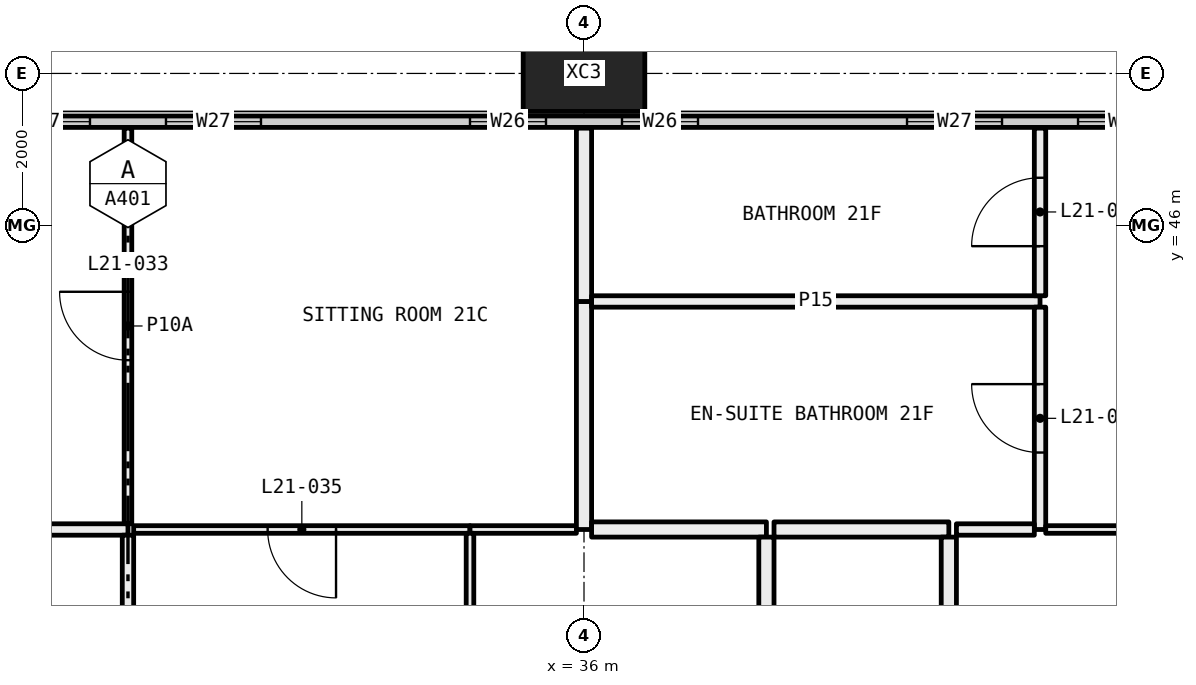
"""IFC4 building model, lengths in metres.
Left out: names, types, materials, properties, quantities, classifications, styles, units other than length and angle.
Written with IfcOpenShell. Run it as: python <this file> out.ifc"""

import sys

from ifc_helpers import new_model, si_unit, direction, frame, frame_2d, origin, origin_2d, place, context, subcontext, project, spatial, rectangle, hollow_rectangle, extrude, element, fill, save


model = new_model("IFC4")
c1 = context("Model", 3, precision=1e-05, world=origin(), true_north=direction((0.0, 1.0)))
c2 = subcontext(c1, "Body", "Model", "MODEL_VIEW")
j1 = project(units=[si_unit("LENGTHUNIT", "METRE"), si_unit("PLANEANGLEUNIT", "RADIAN")], contexts=[c1])
p1 = place(None, origin())
s1 = spatial("IfcSite", under=j1, at=p1, CompositionType="ELEMENT")
p2 = place(p1, origin())
s2 = spatial("IfcBuilding", under=s1, at=p2, CompositionType="ELEMENT")
p3 = place(p2, frame((0.0, 0.0, 85.2)))
s3 = spatial("IfcBuildingStorey", under=s2, at=p3, CompositionType="ELEMENT", Elevation=85.2)
p4 = place(p3, frame((36.0, 48.0, -0.4), z_axis=(0.0, 0.0, 1.0), x_axis=(1.0, 0.0, 0.0)))
e1 = element("IfcColumn", 1, at=p4, inside=s3, PredefinedType="COLUMN", context=c2, shape_type="SweptSolid", body=[
    extrude(hollow_rectangle(XDim=1.6, YDim=1.0, WallThickness=0.065, at=origin_2d()), origin(), (0.0, 0.0, 1.0), 3.45),
])
p5 = place(p3, frame((6.56, 47.365, 0.0), z_axis=(0.0, 0.0, 1.0), x_axis=(1.0, 0.0, 0.0)))
e2 = element("IfcWall", 2, at=p5, inside=s3, PredefinedType="ELEMENTEDWALL", context=c2, shape_type="SweptSolid", body=[
    extrude(rectangle(XDim=58.88, YDim=0.15, at=frame_2d((29.44, 0.0))), origin(), (0.0, 0.0, 1.0), 3.05),
])
p6 = place(p5, frame((0.44, 0.0, 0.45)))
e3 = element("IfcOpeningElement", 3, at=p6, cuts=e2, PredefinedType="OPENING", context=c2, shape_type="SweptSolid", body=[
    extrude(rectangle(XDim=4.5, YDim=2.55, at=frame_2d((2.25, 1.275))), frame((0.0, 0.085, 0.0), z_axis=(0.0, -1.0, 0.0), x_axis=(1.0, 0.0, 0.0)), (0.0, 0.0, 1.0), 0.17),
])
p7 = place(p5, frame((5.94, 0.0, 0.45)))
e4 = element("IfcOpeningElement", 4, at=p7, cuts=e2, PredefinedType="OPENING", context=c2, shape_type="SweptSolid", body=[
    extrude(rectangle(XDim=1.0, YDim=2.55, at=frame_2d((0.5, 1.275))), frame((0.0, 0.085, 0.0), z_axis=(0.0, -1.0, 0.0), x_axis=(1.0, 0.0, 0.0)), (0.0, 0.0, 1.0), 0.17),
])
p8 = place(p5, frame((9.69, 0.0, 0.45)))
e5 = element("IfcOpeningElement", 5, at=p8, cuts=e2, PredefinedType="OPENING", context=c2, shape_type="SweptSolid", body=[
    extrude(rectangle(XDim=1.25, YDim=2.55, at=frame_2d((0.625, 1.275))), frame((0.0, 0.085, 0.0), z_axis=(0.0, -1.0, 0.0), x_axis=(1.0, 0.0, 0.0)), (0.0, 0.0, 1.0), 0.17),
])
p9 = place(p5, frame((11.94, 0.0, 0.45)))
e6 = element("IfcOpeningElement", 6, at=p9, cuts=e2, PredefinedType="OPENING", context=c2, shape_type="SweptSolid", body=[
    extrude(rectangle(XDim=1.25, YDim=2.55, at=frame_2d((0.625, 1.275))), frame((0.0, 0.085, 0.0), z_axis=(0.0, -1.0, 0.0), x_axis=(1.0, 0.0, 0.0)), (0.0, 0.0, 1.0), 0.17),
])
p10 = place(p5, frame((15.94, 0.0, 0.45)))
e7 = element("IfcOpeningElement", 7, at=p10, cuts=e2, PredefinedType="OPENING", context=c2, shape_type="SweptSolid", body=[
    extrude(rectangle(XDim=1.0, YDim=2.55, at=frame_2d((0.5, 1.275))), frame((0.0, 0.085, 0.0), z_axis=(0.0, -1.0, 0.0), x_axis=(1.0, 0.0, 0.0)), (0.0, 0.0, 1.0), 0.17),
])
p11 = place(p5, frame((17.94, 0.0, 0.45)))
e8 = element("IfcOpeningElement", 8, at=p11, cuts=e2, PredefinedType="OPENING", context=c2, shape_type="SweptSolid", body=[
    extrude(rectangle(XDim=1.0, YDim=2.55, at=frame_2d((0.5, 1.275))), frame((0.0, 0.085, 0.0), z_axis=(0.0, -1.0, 0.0), x_axis=(1.0, 0.0, 0.0)), (0.0, 0.0, 1.0), 0.17),
])
p12 = place(p5, frame((21.69, 0.0, 0.45)))
e9 = element("IfcOpeningElement", 9, at=p12, cuts=e2, PredefinedType="OPENING", context=c2, shape_type="SweptSolid", body=[
    extrude(rectangle(XDim=1.25, YDim=2.55, at=frame_2d((0.625, 1.275))), frame((0.0, 0.085, 0.0), z_axis=(0.0, -1.0, 0.0), x_axis=(1.0, 0.0, 0.0)), (0.0, 0.0, 1.0), 0.17),
])
p13 = place(p5, frame((23.94, 0.0, 0.45)))
e10 = element("IfcOpeningElement", 10, at=p13, cuts=e2, PredefinedType="OPENING", context=c2, shape_type="SweptSolid", body=[
    extrude(rectangle(XDim=1.25, YDim=2.55, at=frame_2d((0.625, 1.275))), frame((0.0, 0.085, 0.0), z_axis=(0.0, -1.0, 0.0), x_axis=(1.0, 0.0, 0.0)), (0.0, 0.0, 1.0), 0.17),
])
p14 = place(p5, frame((27.94, 0.0, 0.45)))
e11 = element("IfcOpeningElement", 11, at=p14, cuts=e2, PredefinedType="OPENING", context=c2, shape_type="SweptSolid", body=[
    extrude(rectangle(XDim=1.0, YDim=2.55, at=frame_2d((0.5, 1.275))), frame((0.0, 0.085, 0.0), z_axis=(0.0, -1.0, 0.0), x_axis=(1.0, 0.0, 0.0)), (0.0, 0.0, 1.0), 0.17),
])
p15 = place(p5, frame((29.94, 0.0, 0.45)))
e12 = element("IfcOpeningElement", 12, at=p15, cuts=e2, PredefinedType="OPENING", context=c2, shape_type="SweptSolid", body=[
    extrude(rectangle(XDim=1.0, YDim=2.55, at=frame_2d((0.5, 1.275))), frame((0.0, 0.085, 0.0), z_axis=(0.0, -1.0, 0.0), x_axis=(1.0, 0.0, 0.0)), (0.0, 0.0, 1.0), 0.17),
])
p16 = place(p5, frame((33.69, 0.0, 0.45)))
e13 = element("IfcOpeningElement", 13, at=p16, cuts=e2, PredefinedType="OPENING", context=c2, shape_type="SweptSolid", body=[
    extrude(rectangle(XDim=1.25, YDim=2.55, at=frame_2d((0.625, 1.275))), frame((0.0, 0.085, 0.0), z_axis=(0.0, -1.0, 0.0), x_axis=(1.0, 0.0, 0.0)), (0.0, 0.0, 1.0), 0.17),
])
p17 = place(p5, frame((35.94, 0.0, 0.45)))
e14 = element("IfcOpeningElement", 14, at=p17, cuts=e2, PredefinedType="OPENING", context=c2, shape_type="SweptSolid", body=[
    extrude(rectangle(XDim=1.25, YDim=2.55, at=frame_2d((0.625, 1.275))), frame((0.0, 0.085, 0.0), z_axis=(0.0, -1.0, 0.0), x_axis=(1.0, 0.0, 0.0)), (0.0, 0.0, 1.0), 0.17),
])
p18 = place(p5, frame((39.94, 0.0, 0.45)))
e15 = element("IfcOpeningElement", 15, at=p18, cuts=e2, PredefinedType="OPENING", context=c2, shape_type="SweptSolid", body=[
    extrude(rectangle(XDim=1.0, YDim=2.55, at=frame_2d((0.5, 1.275))), frame((0.0, 0.085, 0.0), z_axis=(0.0, -1.0, 0.0), x_axis=(1.0, 0.0, 0.0)), (0.0, 0.0, 1.0), 0.17),
])
p19 = place(p5, frame((41.94, 0.0, 0.45)))
e16 = element("IfcOpeningElement", 16, at=p19, cuts=e2, PredefinedType="OPENING", context=c2, shape_type="SweptSolid", body=[
    extrude(rectangle(XDim=1.0, YDim=2.55, at=frame_2d((0.5, 1.275))), frame((0.0, 0.085, 0.0), z_axis=(0.0, -1.0, 0.0), x_axis=(1.0, 0.0, 0.0)), (0.0, 0.0, 1.0), 0.17),
])
p20 = place(p5, frame((45.69, 0.0, 0.45)))
e17 = element("IfcOpeningElement", 17, at=p20, cuts=e2, PredefinedType="OPENING", context=c2, shape_type="SweptSolid", body=[
    extrude(rectangle(XDim=1.25, YDim=2.55, at=frame_2d((0.625, 1.275))), frame((0.0, 0.085, 0.0), z_axis=(0.0, -1.0, 0.0), x_axis=(1.0, 0.0, 0.0)), (0.0, 0.0, 1.0), 0.17),
])
p21 = place(p5, frame((47.94, 0.0, 0.45)))
e18 = element("IfcOpeningElement", 18, at=p21, cuts=e2, PredefinedType="OPENING", context=c2, shape_type="SweptSolid", body=[
    extrude(rectangle(XDim=1.25, YDim=2.55, at=frame_2d((0.625, 1.275))), frame((0.0, 0.085, 0.0), z_axis=(0.0, -1.0, 0.0), x_axis=(1.0, 0.0, 0.0)), (0.0, 0.0, 1.0), 0.17),
])
p22 = place(p5, frame((51.94, 0.0, 0.45)))
e19 = element("IfcOpeningElement", 19, at=p22, cuts=e2, PredefinedType="OPENING", context=c2, shape_type="SweptSolid", body=[
    extrude(rectangle(XDim=1.0, YDim=2.55, at=frame_2d((0.5, 1.275))), frame((0.0, 0.085, 0.0), z_axis=(0.0, -1.0, 0.0), x_axis=(1.0, 0.0, 0.0)), (0.0, 0.0, 1.0), 0.17),
])
p23 = place(p5, frame((53.94, 0.0, 0.45)))
e20 = element("IfcOpeningElement", 20, at=p23, cuts=e2, PredefinedType="OPENING", context=c2, shape_type="SweptSolid", body=[
    extrude(rectangle(XDim=4.5, YDim=2.55, at=frame_2d((2.25, 1.275))), frame((0.0, 0.085, 0.0), z_axis=(0.0, -1.0, 0.0), x_axis=(1.0, 0.0, 0.0)), (0.0, 0.0, 1.0), 0.17),
])
p24 = place(p3, frame((30.0, 42.075, 0.0), z_axis=(0.0, 0.0, 1.0), x_axis=(0.0, 1.0, 0.0)))
e21 = element("IfcWall", 21, at=p24, inside=s3, PredefinedType="PARTITIONING", context=c2, shape_type="SweptSolid", body=[
    extrude(rectangle(XDim=5.205, YDim=0.1, at=frame_2d((2.603, 0.0))), origin(), (0.0, 0.0, 1.0), 3.05),
])
p25 = place(p24, frame((2.153, 0.0, 0.0)))
e22 = element("IfcOpeningElement", 22, at=p25, cuts=e21, PredefinedType="OPENING", context=c2, shape_type="SweptSolid", body=[
    extrude(rectangle(XDim=0.9, YDim=2.1, at=frame_2d((0.45, 1.05))), frame((0.0, 0.06, 0.0), z_axis=(0.0, -1.0, 0.0), x_axis=(1.0, 0.0, 0.0)), (0.0, 0.0, 1.0), 0.12),
])
p26 = place(p3, frame((26.0, 42.0, 0.0), z_axis=(0.0, 0.0, 1.0), x_axis=(1.0, 0.0, 0.0)))
e23 = element("IfcWall", 23, at=p26, inside=s3, PredefinedType="PARTITIONING", context=c2, shape_type="SweptSolid", body=[
    extrude(rectangle(XDim=4.0, YDim=0.15, at=frame_2d((2.0, 0.0))), origin(), (0.0, 0.0, 1.0), 3.05),
])
p27 = place(p26, frame((1.55, 0.0, 0.0)))
e24 = element("IfcOpeningElement", 24, at=p27, cuts=e23, PredefinedType="OPENING", context=c2, shape_type="SweptSolid", body=[
    extrude(rectangle(XDim=0.9, YDim=2.1, at=frame_2d((0.45, 1.05))), frame((0.0, 0.085, 0.0), z_axis=(0.0, -1.0, 0.0), x_axis=(1.0, 0.0, 0.0)), (0.0, 0.0, 1.0), 0.17),
])
p28 = place(p3, frame((30.075, 42.0, 0.0), z_axis=(0.0, 0.0, 1.0), x_axis=(1.0, 0.0, 0.0)))
e25 = element("IfcWall", 25, at=p28, inside=s3, PredefinedType="PARTITIONING", context=c2, shape_type="SweptSolid", body=[
    extrude(rectangle(XDim=4.425, YDim=0.1, at=frame_2d((2.212, 0.0))), origin(), (0.0, 0.0, 1.0), 3.05),
])
p29 = place(p28, frame((1.762, 0.0, 0.0)))
e26 = element("IfcOpeningElement", 26, at=p29, cuts=e25, PredefinedType="OPENING", context=c2, shape_type="SweptSolid", body=[
    extrude(rectangle(XDim=0.9, YDim=2.1, at=frame_2d((0.45, 1.05))), frame((0.0, 0.06, 0.0), z_axis=(0.0, -1.0, 0.0), x_axis=(1.0, 0.0, 0.0)), (0.0, 0.0, 1.0), 0.12),
])
p30 = place(p3, frame((34.5, 42.0, 0.0), z_axis=(0.0, 0.0, 1.0), x_axis=(1.0, 0.0, 0.0)))
e27 = element("IfcWall", 27, at=p30, inside=s3, PredefinedType="PARTITIONING", context=c2, shape_type="SweptSolid", body=[
    extrude(rectangle(XDim=1.4, YDim=0.1, at=frame_2d((0.7, 0.0))), origin(), (0.0, 0.0, 1.0), 3.05),
])
p31 = place(p3, frame((36.0, 42.0, 0.0), z_axis=(0.0, 0.0, 1.0), x_axis=(0.0, 1.0, 0.0)))
e28 = element("IfcWall", 28, at=p31, inside=s3, PredefinedType="PARTITIONING", context=c2, shape_type="SweptSolid", body=[
    extrude(rectangle(XDim=3.0, YDim=0.2, at=frame_2d((1.5, 0.0))), origin(), (0.0, 0.0, 1.0), 2.45),
])
p32 = place(p3, frame((36.0, 45.0, 0.0), z_axis=(0.0, 0.0, 1.0), x_axis=(0.0, 1.0, 0.0)))
e29 = element("IfcWall", 29, at=p32, inside=s3, PredefinedType="PARTITIONING", context=c2, shape_type="SweptSolid", body=[
    extrude(rectangle(XDim=2.28, YDim=0.2, at=frame_2d((1.14, 0.0))), origin(), (0.0, 0.0, 1.0), 2.45),
])
p33 = place(p3, frame((30.0, 38.175, 0.0), z_axis=(0.0, 0.0, 1.0), x_axis=(0.0, 1.0, 0.0)))
e30 = element("IfcWall", 30, at=p33, inside=s3, PredefinedType="PARTITIONING", context=c2, shape_type="SweptSolid", body=[
    extrude(rectangle(XDim=3.75, YDim=0.15, at=frame_2d((1.875, 0.0))), origin(), (0.0, 0.0, 1.0), 3.05),
])
p34 = place(p3, frame((34.5, 36.1, 0.0), z_axis=(0.0, 0.0, 1.0), x_axis=(0.0, 1.0, 0.0)))
e31 = element("IfcWall", 31, at=p34, inside=s3, PredefinedType="PARTITIONING", context=c2, shape_type="SweptSolid", body=[
    extrude(rectangle(XDim=5.85, YDim=0.1, at=frame_2d((2.925, 0.0))), origin(), (0.0, 0.0, 1.0), 3.05),
])
p35 = place(p34, frame((2.475, 0.0, 0.0)))
e32 = element("IfcOpeningElement", 32, at=p35, cuts=e31, PredefinedType="OPENING", context=c2, shape_type="SweptSolid", body=[
    extrude(rectangle(XDim=0.9, YDim=2.1, at=frame_2d((0.45, 1.05))), frame((0.0, 0.06, 0.0), z_axis=(0.0, -1.0, 0.0), x_axis=(1.0, 0.0, 0.0)), (0.0, 0.0, 1.0), 0.12),
])
p36 = place(p3, frame((38.4, 42.0, 0.0), z_axis=(0.0, 0.0, 1.0), x_axis=(-1.0, 0.0, 0.0)))
e33 = element("IfcWall", 33, at=p36, inside=s3, PredefinedType="PARTITIONING", context=c2, shape_type="SweptSolid", body=[
    extrude(rectangle(XDim=2.3, YDim=0.2, at=frame_2d((1.15, 0.0))), origin(), (0.0, 0.0, 1.0), 3.05),
])
p37 = place(p3, frame((38.4, 36.1, 0.0), z_axis=(0.0, 0.0, 1.0), x_axis=(0.0, 1.0, 0.0)))
e34 = element("IfcWall", 34, at=p37, inside=s3, PredefinedType="PARTITIONING", context=c2, shape_type="SweptSolid", body=[
    extrude(rectangle(XDim=5.8, YDim=0.2, at=frame_2d((2.9, 0.0))), origin(), (0.0, 0.0, 1.0), 3.05),
])
p38 = place(p3, frame((42.0, 45.0, 0.0), z_axis=(0.0, 0.0, 1.0), x_axis=(-1.0, 0.0, 0.0)))
e35 = element("IfcWall", 35, at=p38, inside=s3, PredefinedType="PARTITIONING", context=c2, shape_type="SweptSolid", body=[
    extrude(rectangle(XDim=5.9, YDim=0.15, at=frame_2d((2.95, 0.0))), origin(), (0.0, 0.0, 1.0), 3.05),
])
p39 = place(p3, frame((42.0, 42.0, 0.0), z_axis=(0.0, 0.0, 1.0), x_axis=(0.0, 1.0, 0.0)))
e36 = element("IfcWall", 36, at=p39, inside=s3, PredefinedType="PARTITIONING", context=c2, shape_type="SweptSolid", body=[
    extrude(rectangle(XDim=2.925, YDim=0.15, at=frame_2d((1.462, 0.0))), origin(), (0.0, 0.0, 1.0), 3.05),
])
p40 = place(p39, frame((1.012, 0.0, 0.0)))
e37 = element("IfcOpeningElement", 37, at=p40, cuts=e36, PredefinedType="OPENING", context=c2, shape_type="SweptSolid", body=[
    extrude(rectangle(XDim=0.9, YDim=2.1, at=frame_2d((0.45, 1.05))), frame((0.0, 0.085, 0.0), z_axis=(0.0, -1.0, 0.0), x_axis=(1.0, 0.0, 0.0)), (0.0, 0.0, 1.0), 0.17),
])
p41 = place(p3, frame((40.9, 42.0, 0.0), z_axis=(0.0, 0.0, 1.0), x_axis=(1.0, 0.0, 0.0)))
e38 = element("IfcWall", 38, at=p41, inside=s3, PredefinedType="PARTITIONING", context=c2, shape_type="SweptSolid", body=[
    extrude(rectangle(XDim=1.025, YDim=0.15, at=frame_2d((0.513, 0.0))), origin(), (0.0, 0.0, 1.0), 3.05),
])
p42 = place(p3, frame((38.5, 42.0, 0.0), z_axis=(0.0, 0.0, 1.0), x_axis=(1.0, 0.0, 0.0)))
e39 = element("IfcWall", 39, at=p42, inside=s3, PredefinedType="PARTITIONING", context=c2, shape_type="SweptSolid", body=[
    extrude(rectangle(XDim=2.3, YDim=0.2, at=frame_2d((1.15, 0.0))), origin(), (0.0, 0.0, 1.0), 3.05),
])
p43 = place(p3, frame((42.0, 45.075, 0.0), z_axis=(0.0, 0.0, 1.0), x_axis=(0.0, 1.0, 0.0)))
e40 = element("IfcWall", 40, at=p43, inside=s3, PredefinedType="PARTITIONING", context=c2, shape_type="SweptSolid", body=[
    extrude(rectangle(XDim=2.205, YDim=0.15, at=frame_2d((1.103, 0.0))), origin(), (0.0, 0.0, 1.0), 3.05),
])
p44 = place(p43, frame((0.653, 0.0, 0.0)))
e41 = element("IfcOpeningElement", 41, at=p44, cuts=e40, PredefinedType="OPENING", context=c2, shape_type="SweptSolid", body=[
    extrude(rectangle(XDim=0.9, YDim=2.1, at=frame_2d((0.45, 1.05))), frame((0.0, 0.085, 0.0), z_axis=(0.0, -1.0, 0.0), x_axis=(1.0, 0.0, 0.0)), (0.0, 0.0, 1.0), 0.17),
])
p45 = place(p3, frame((42.075, 42.0, 0.0), z_axis=(0.0, 0.0, 1.0), x_axis=(1.0, 0.0, 0.0)))
e42 = element("IfcWall", 42, at=p45, inside=s3, PredefinedType="PARTITIONING", context=c2, shape_type="SweptSolid", body=[
    extrude(rectangle(XDim=3.925, YDim=0.1, at=frame_2d((1.962, 0.0))), origin(), (0.0, 0.0, 1.0), 3.05),
])
p46 = place(p45, frame((1.512, 0.0, 0.0)))
e43 = element("IfcOpeningElement", 43, at=p46, cuts=e42, PredefinedType="OPENING", context=c2, shape_type="SweptSolid", body=[
    extrude(rectangle(XDim=0.9, YDim=2.1, at=frame_2d((0.45, 1.05))), frame((0.0, 0.06, 0.0), z_axis=(0.0, -1.0, 0.0), x_axis=(1.0, 0.0, 0.0)), (0.0, 0.0, 1.0), 0.12),
])
p47 = place(p3, frame((40.8, 41.9, 0.0), z_axis=(0.0, 0.0, 1.0), x_axis=(0.0, -1.0, 0.0)))
e44 = element("IfcWall", 44, at=p47, inside=s3, PredefinedType="PARTITIONING", context=c2, shape_type="SweptSolid", body=[
    extrude(rectangle(XDim=6.2, YDim=0.2, at=frame_2d((3.1, 0.0))), origin(), (0.0, 0.0, 1.0), 2.45),
])
p48 = place(p12, origin())
e45 = element("IfcWindow", 45, at=p48, inside=s3, PartitioningType="SINGLE_PANEL", PredefinedType="WINDOW", context=c2, shape_type="SweptSolid", body=[
    extrude(rectangle(XDim=1.25, YDim=2.55, at=frame_2d((0.625, 1.275))), frame((0.0, 0.03, 0.0), z_axis=(0.0, -1.0, 0.0), x_axis=(1.0, 0.0, 0.0)), (0.0, 0.0, 1.0), 0.06),
])
fill(e9, e45)
p49 = place(p13, origin())
e46 = element("IfcWindow", 46, at=p49, inside=s3, PartitioningType="SINGLE_PANEL", PredefinedType="WINDOW", context=c2, shape_type="SweptSolid", body=[
    extrude(rectangle(XDim=1.25, YDim=2.55, at=frame_2d((0.625, 1.275))), frame((0.0, 0.03, 0.0), z_axis=(0.0, -1.0, 0.0), x_axis=(1.0, 0.0, 0.0)), (0.0, 0.0, 1.0), 0.06),
])
fill(e10, e46)
p50 = place(p14, origin())
e47 = element("IfcWindow", 47, at=p50, inside=s3, PartitioningType="SINGLE_PANEL", PredefinedType="WINDOW", context=c2, shape_type="SweptSolid", body=[
    extrude(rectangle(XDim=1.0, YDim=2.55, at=frame_2d((0.5, 1.275))), frame((0.0, 0.03, 0.0), z_axis=(0.0, -1.0, 0.0), x_axis=(1.0, 0.0, 0.0)), (0.0, 0.0, 1.0), 0.06),
])
fill(e11, e47)
p51 = place(p15, origin())
e48 = element("IfcWindow", 48, at=p51, inside=s3, PartitioningType="SINGLE_PANEL", PredefinedType="WINDOW", context=c2, shape_type="SweptSolid", body=[
    extrude(rectangle(XDim=1.0, YDim=2.55, at=frame_2d((0.5, 1.275))), frame((0.0, 0.03, 0.0), z_axis=(0.0, -1.0, 0.0), x_axis=(1.0, 0.0, 0.0)), (0.0, 0.0, 1.0), 0.06),
])
fill(e12, e48)
p52 = place(p16, origin())
e49 = element("IfcWindow", 49, at=p52, inside=s3, PartitioningType="SINGLE_PANEL", PredefinedType="WINDOW", context=c2, shape_type="SweptSolid", body=[
    extrude(rectangle(XDim=1.25, YDim=2.55, at=frame_2d((0.625, 1.275))), frame((0.0, 0.03, 0.0), z_axis=(0.0, -1.0, 0.0), x_axis=(1.0, 0.0, 0.0)), (0.0, 0.0, 1.0), 0.06),
])
fill(e13, e49)
p53 = place(p17, origin())
e50 = element("IfcWindow", 50, at=p53, inside=s3, PartitioningType="SINGLE_PANEL", PredefinedType="WINDOW", context=c2, shape_type="SweptSolid", body=[
    extrude(rectangle(XDim=1.25, YDim=2.55, at=frame_2d((0.625, 1.275))), frame((0.0, 0.03, 0.0), z_axis=(0.0, -1.0, 0.0), x_axis=(1.0, 0.0, 0.0)), (0.0, 0.0, 1.0), 0.06),
])
fill(e14, e50)
p54 = place(p25, origin())
e51 = element("IfcDoor", 51, at=p54, inside=s3, OperationType="SINGLE_SWING_LEFT", PredefinedType="DOOR", context=c2, shape_type="SweptSolid", body=[
    extrude(rectangle(XDim=0.9, YDim=2.1, at=frame_2d((0.45, 1.05))), frame((0.0, 0.025, 0.0), z_axis=(0.0, -1.0, 0.0), x_axis=(1.0, 0.0, 0.0)), (0.0, 0.0, 1.0), 0.05),
])
fill(e22, e51)
p55 = place(p29, frame((0.9, 0.0, 0.0), x_axis=(-1.0, 0.0, 0.0)))
e52 = element("IfcDoor", 52, at=p55, inside=s3, OperationType="SINGLE_SWING_RIGHT", PredefinedType="DOOR", context=c2, shape_type="SweptSolid", body=[
    extrude(rectangle(XDim=0.9, YDim=2.1, at=frame_2d((0.45, 1.05))), frame((0.0, 0.025, 0.0), z_axis=(0.0, -1.0, 0.0), x_axis=(1.0, 0.0, 0.0)), (0.0, 0.0, 1.0), 0.05),
])
fill(e26, e52)
p56 = place(p40, origin())
e53 = element("IfcDoor", 53, at=p56, inside=s3, OperationType="SINGLE_SWING_LEFT", PredefinedType="DOOR", context=c2, shape_type="SweptSolid", body=[
    extrude(rectangle(XDim=0.9, YDim=2.1, at=frame_2d((0.45, 1.05))), frame((0.0, 0.025, 0.0), z_axis=(0.0, -1.0, 0.0), x_axis=(1.0, 0.0, 0.0)), (0.0, 0.0, 1.0), 0.05),
])
fill(e37, e53)
p57 = place(p44, origin())
e54 = element("IfcDoor", 54, at=p57, inside=s3, OperationType="SINGLE_SWING_RIGHT", PredefinedType="DOOR", context=c2, shape_type="SweptSolid", body=[
    extrude(rectangle(XDim=0.9, YDim=2.1, at=frame_2d((0.45, 1.05))), frame((0.0, 0.025, 0.0), z_axis=(0.0, -1.0, 0.0), x_axis=(1.0, 0.0, 0.0)), (0.0, 0.0, 1.0), 0.05),
])
fill(e41, e54)
save(model, sys.argv[1])
